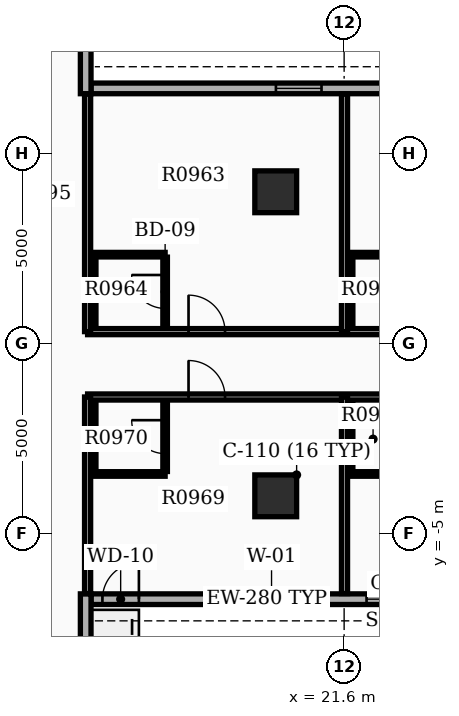
"""IFC4 building model, lengths in metres.
Left out: names, types, materials, properties, quantities, classifications, styles, units other than length and angle.
Written with IfcOpenShell. Run it as: python <this file> out.ifc"""

import sys

from ifc_helpers import new_model, si_unit, direction, frame, frame_2d, origin, origin_2d, place, context, subcontext, project, spatial, rectangle, extrude, element, fill, save


model = new_model("IFC4")
c1 = context("Model", 3, precision=1e-05, world=origin(), true_north=direction((0.0, 1.0)))
c2 = subcontext(c1, "Body", "Model", "MODEL_VIEW")
j1 = project(units=[si_unit("LENGTHUNIT", "METRE"), si_unit("PLANEANGLEUNIT", "RADIAN")], contexts=[c1])
p1 = place(None, origin())
s1 = spatial("IfcSite", under=j1, at=p1, CompositionType="ELEMENT")
p2 = place(p1, origin())
s2 = spatial("IfcBuilding", under=s1, at=p2, CompositionType="ELEMENT")
p3 = place(p2, frame((0.0, 0.0, 63.9)))
s3 = spatial("IfcBuildingStorey", under=s2, at=p3, CompositionType="ELEMENT", Elevation=63.9)
for number, where, z_axis, x_axis in (
    (1, (19.8, -4.0, 0.0), (0.0, 0.0, 1.0), (1.0, 0.0, 0.0)),
    (2, (19.8, 4.0, 0.0), (0.0, 0.0, 1.0), (1.0, 0.0, 0.0)),
):
    element("IfcColumn", number, at=place(p3, frame(where, z_axis=z_axis, x_axis=x_axis)), inside=s3, PredefinedType="COLUMN", context=c2, shape_type="SweptSolid", body=[
        extrude(rectangle(XDim=1.1, YDim=1.1, at=origin_2d()), origin(), (0.0, 0.0, 1.0), 3.9),
    ])
p4 = place(p3, frame((14.94, -6.72, 0.0), z_axis=(0.0, 0.0, 1.0), x_axis=(1.0, 0.0, 0.0)))
e3 = element("IfcWall", 3, at=p4, inside=s3, PredefinedType="STANDARD", context=c2, shape_type="SweptSolid", body=[
    extrude(rectangle(XDim=20.1, YDim=0.28, at=frame_2d((10.05, 0.0))), origin(), (0.0, 0.0, 1.0), 2.91),
])
p5 = place(p4, frame((4.05, 0.0, 0.8)))
e4 = element("IfcOpeningElement", 4, at=p5, cuts=e3, PredefinedType="OPENING", context=c2, shape_type="SweptSolid", body=[
    extrude(rectangle(XDim=1.4, YDim=1.6, at=frame_2d((0.7, 0.8))), frame((0.0, 0.15, 0.0), z_axis=(0.0, -1.0, 0.0), x_axis=(1.0, 0.0, 0.0)), (0.0, 0.0, 1.0), 0.3),
])
p6 = place(p4, frame((7.25, 0.0, 0.8)))
e5 = element("IfcOpeningElement", 5, at=p6, cuts=e3, PredefinedType="OPENING", context=c2, shape_type="SweptSolid", body=[
    extrude(rectangle(XDim=1.4, YDim=1.6, at=frame_2d((0.7, 0.8))), frame((0.0, 0.15, 0.0), z_axis=(0.0, -1.0, 0.0), x_axis=(1.0, 0.0, 0.0)), (0.0, 0.0, 1.0), 0.3),
])
p7 = place(p4, frame((10.45, 0.0, 0.8)))
e6 = element("IfcOpeningElement", 6, at=p7, cuts=e3, PredefinedType="OPENING", context=c2, shape_type="SweptSolid", body=[
    extrude(rectangle(XDim=1.4, YDim=1.6, at=frame_2d((0.7, 0.8))), frame((0.0, 0.15, 0.0), z_axis=(0.0, -1.0, 0.0), x_axis=(1.0, 0.0, 0.0)), (0.0, 0.0, 1.0), 0.3),
])
p8 = place(p4, frame((0.3, 0.0, 0.0)))
e7 = element("IfcOpeningElement", 7, at=p8, cuts=e3, PredefinedType="OPENING", context=c2, shape_type="SweptSolid", body=[
    extrude(rectangle(XDim=0.96, YDim=2.1, at=frame_2d((0.48, 1.05))), frame((0.0, 0.15, 0.0), z_axis=(0.0, -1.0, 0.0), x_axis=(1.0, 0.0, 0.0)), (0.0, 0.0, 1.0), 0.3),
])
p9 = place(p3, frame((35.04, 6.72, 0.0), z_axis=(0.0, 0.0, 1.0), x_axis=(-1.0, 0.0, 0.0)))
e8 = element("IfcWall", 8, at=p9, inside=s3, PredefinedType="STANDARD", context=c2, shape_type="SweptSolid", body=[
    extrude(rectangle(XDim=20.1, YDim=0.28, at=frame_2d((10.05, 0.0))), origin(), (0.0, 0.0, 1.0), 2.91),
])
p10 = place(p9, frame((0.85, 0.0, 0.8)))
e9 = element("IfcOpeningElement", 9, at=p10, cuts=e8, PredefinedType="OPENING", context=c2, shape_type="SweptSolid", body=[
    extrude(rectangle(XDim=1.4, YDim=1.6, at=frame_2d((0.7, 0.8))), frame((0.0, 0.15, 0.0), z_axis=(0.0, -1.0, 0.0), x_axis=(1.0, 0.0, 0.0)), (0.0, 0.0, 1.0), 0.3),
])
p11 = place(p9, frame((4.05, 0.0, 0.8)))
e10 = element("IfcOpeningElement", 10, at=p11, cuts=e8, PredefinedType="OPENING", context=c2, shape_type="SweptSolid", body=[
    extrude(rectangle(XDim=1.4, YDim=1.6, at=frame_2d((0.7, 0.8))), frame((0.0, 0.15, 0.0), z_axis=(0.0, -1.0, 0.0), x_axis=(1.0, 0.0, 0.0)), (0.0, 0.0, 1.0), 0.3),
])
p12 = place(p9, frame((7.25, 0.0, 0.8)))
e11 = element("IfcOpeningElement", 11, at=p12, cuts=e8, PredefinedType="OPENING", context=c2, shape_type="SweptSolid", body=[
    extrude(rectangle(XDim=1.4, YDim=1.6, at=frame_2d((0.7, 0.8))), frame((0.0, 0.15, 0.0), z_axis=(0.0, -1.0, 0.0), x_axis=(1.0, 0.0, 0.0)), (0.0, 0.0, 1.0), 0.3),
])
p13 = place(p9, frame((10.45, 0.0, 0.8)))
e12 = element("IfcOpeningElement", 12, at=p13, cuts=e8, PredefinedType="OPENING", context=c2, shape_type="SweptSolid", body=[
    extrude(rectangle(XDim=1.4, YDim=1.6, at=frame_2d((0.7, 0.8))), frame((0.0, 0.15, 0.0), z_axis=(0.0, -1.0, 0.0), x_axis=(1.0, 0.0, 0.0)), (0.0, 0.0, 1.0), 0.3),
])
p14 = place(p9, frame((14.035, 0.0, 0.85)))
e13 = element("IfcOpeningElement", 13, at=p14, cuts=e8, PredefinedType="OPENING", context=c2, shape_type="SweptSolid", body=[
    extrude(rectangle(XDim=1.2, YDim=1.6, at=frame_2d((0.6, 0.8))), frame((0.0, 0.15, 0.0), z_axis=(0.0, -1.0, 0.0), x_axis=(1.0, 0.0, 0.0)), (0.0, 0.0, 1.0), 0.3),
])
for number, where, z_axis, x_axis in (
    (14, (14.8, 6.58, 0.0), (0.0, 0.0, 1.0), (0.0, 1.0, 0.0)),
    (15, (14.8, -6.58, 0.0), (0.0, 0.0, 1.0), (0.0, -1.0, 0.0)),
):
    element("IfcWall", number, at=place(p3, frame(where, z_axis=z_axis, x_axis=x_axis)), inside=s3, PredefinedType="STANDARD", context=c2, shape_type="SweptSolid", body=[
        extrude(rectangle(XDim=6.86, YDim=0.28, at=frame_2d((3.43, 0.0))), origin(), (0.0, 0.0, 1.0), 2.91),
    ])
p15 = place(p3, frame((14.85, 0.32, 0.0), z_axis=(0.0, 0.0, 1.0), x_axis=(1.0, 0.0, 0.0)))
e16 = element("IfcWall", 16, at=p15, inside=s3, PredefinedType="PARTITIONING", context=c2, shape_type="SweptSolid", body=[
    extrude(rectangle(XDim=20.182, YDim=0.16, at=frame_2d((10.091, 0.0))), origin(), (0.0, 0.0, 1.0), 2.9),
])
p16 = place(p15, frame((2.656, 0.0, 0.0)))
e17 = element("IfcOpeningElement", 17, at=p16, cuts=e16, PredefinedType="OPENING", context=c2, shape_type="SweptSolid", body=[
    extrude(rectangle(XDim=0.96, YDim=2.15, at=frame_2d((0.48, 1.075))), frame((0.0, 0.09, 0.0), z_axis=(0.0, -1.0, 0.0), x_axis=(1.0, 0.0, 0.0)), (0.0, 0.0, 1.0), 0.18),
])
p17 = place(p15, frame((9.442, 0.0, 0.0)))
e18 = element("IfcOpeningElement", 18, at=p17, cuts=e16, PredefinedType="OPENING", context=c2, shape_type="SweptSolid", body=[
    extrude(rectangle(XDim=0.96, YDim=2.15, at=frame_2d((0.48, 1.075))), frame((0.0, 0.09, 0.0), z_axis=(0.0, -1.0, 0.0), x_axis=(1.0, 0.0, 0.0)), (0.0, 0.0, 1.0), 0.18),
])
p18 = place(p15, frame((16.627, 0.0, 0.0)))
e19 = element("IfcOpeningElement", 19, at=p18, cuts=e16, PredefinedType="OPENING", context=c2, shape_type="SweptSolid", body=[
    extrude(rectangle(XDim=0.96, YDim=2.15, at=frame_2d((0.48, 1.075))), frame((0.0, 0.09, 0.0), z_axis=(0.0, -1.0, 0.0), x_axis=(1.0, 0.0, 0.0)), (0.0, 0.0, 1.0), 0.18),
])
for number, where, z_axis, x_axis in (
    (20, (14.85, 0.32, 0.0), (0.0, 0.0, 1.0), (0.0, 1.0, 0.0)),
    (21, (21.61, 0.32, 0.0), (0.0, 0.0, 1.0), (0.0, 1.0, 0.0)),
):
    element("IfcWall", number, at=place(p3, frame(where, z_axis=z_axis, x_axis=x_axis)), inside=s3, PredefinedType="PARTITIONING", context=c2, shape_type="SweptSolid", body=[
        extrude(rectangle(XDim=6.252, YDim=0.16, at=frame_2d((3.126, 0.0))), origin(), (0.0, 0.0, 1.0), 2.9),
    ])
p19 = place(p3, frame((16.89, 0.46, 0.0), z_axis=(0.0, 0.0, 1.0), x_axis=(0.0, 1.0, 0.0)))
e22 = element("IfcWall", 22, at=p19, inside=s3, PredefinedType="PARTITIONING", context=c2, shape_type="SweptSolid", body=[
    extrude(rectangle(XDim=1.82, YDim=0.12, at=frame_2d((0.91, 0.0))), origin(), (0.0, 0.0, 1.0), 2.9),
])
p20 = place(p19, frame((0.47, 0.0, 0.0)))
e23 = element("IfcOpeningElement", 23, at=p20, cuts=e22, PredefinedType="OPENING", context=c2, shape_type="SweptSolid", body=[
    extrude(rectangle(XDim=0.88, YDim=2.1, at=frame_2d((0.44, 1.05))), frame((0.0, 0.07, 0.0), z_axis=(0.0, -1.0, 0.0), x_axis=(1.0, 0.0, 0.0)), (0.0, 0.0, 1.0), 0.14),
])
p21 = place(p3, frame((15.01, 0.46, 0.0), z_axis=(0.0, 0.0, 1.0), x_axis=(0.0, 1.0, 0.0)))
e24 = element("IfcWall", 24, at=p21, inside=s3, PredefinedType="PARTITIONING", context=c2, shape_type="SweptSolid", body=[
    extrude(rectangle(XDim=1.82, YDim=0.12, at=frame_2d((0.91, 0.0))), origin(), (0.0, 0.0, 1.0), 2.9),
])
p22 = place(p3, frame((15.01, 2.345, 0.0), z_axis=(0.0, 0.0, 1.0), x_axis=(1.0, 0.0, 0.0)))
e25 = element("IfcWall", 25, at=p22, inside=s3, PredefinedType="PARTITIONING", context=c2, shape_type="SweptSolid", body=[
    extrude(rectangle(XDim=1.88, YDim=0.12, at=frame_2d((0.94, 0.0))), origin(), (0.0, 0.0, 1.0), 2.9),
])
p23 = place(p3, frame((21.77, 0.46, 0.0), z_axis=(0.0, 0.0, 1.0), x_axis=(0.0, 1.0, 0.0)))
e26 = element("IfcWall", 26, at=p23, inside=s3, PredefinedType="PARTITIONING", context=c2, shape_type="SweptSolid", body=[
    extrude(rectangle(XDim=1.82, YDim=0.12, at=frame_2d((0.91, 0.0))), origin(), (0.0, 0.0, 1.0), 2.9),
])
p24 = place(p3, frame((21.77, 2.345, 0.0), z_axis=(0.0, 0.0, 1.0), x_axis=(1.0, 0.0, 0.0)))
e27 = element("IfcWall", 27, at=p24, inside=s3, PredefinedType="PARTITIONING", context=c2, shape_type="SweptSolid", body=[
    extrude(rectangle(XDim=1.88, YDim=0.12, at=frame_2d((0.94, 0.0))), origin(), (0.0, 0.0, 1.0), 2.9),
])
p25 = place(p3, frame((14.85, -1.4, 0.0), z_axis=(0.0, 0.0, 1.0), x_axis=(1.0, 0.0, 0.0)))
e28 = element("IfcWall", 28, at=p25, inside=s3, PredefinedType="PARTITIONING", context=c2, shape_type="SweptSolid", body=[
    extrude(rectangle(XDim=20.182, YDim=0.16, at=frame_2d((10.091, 0.0))), origin(), (0.0, 0.0, 1.0), 2.9),
])
p26 = place(p25, frame((2.656, 0.0, 0.0)))
e29 = element("IfcOpeningElement", 29, at=p26, cuts=e28, PredefinedType="OPENING", context=c2, shape_type="SweptSolid", body=[
    extrude(rectangle(XDim=0.96, YDim=2.15, at=frame_2d((0.48, 1.075))), frame((0.0, 0.09, 0.0), z_axis=(0.0, -1.0, 0.0), x_axis=(1.0, 0.0, 0.0)), (0.0, 0.0, 1.0), 0.18),
])
p27 = place(p25, frame((9.442, 0.0, 0.0)))
e30 = element("IfcOpeningElement", 30, at=p27, cuts=e28, PredefinedType="OPENING", context=c2, shape_type="SweptSolid", body=[
    extrude(rectangle(XDim=0.96, YDim=2.15, at=frame_2d((0.48, 1.075))), frame((0.0, 0.09, 0.0), z_axis=(0.0, -1.0, 0.0), x_axis=(1.0, 0.0, 0.0)), (0.0, 0.0, 1.0), 0.18),
])
p28 = place(p25, frame((16.627, 0.0, 0.0)))
e31 = element("IfcOpeningElement", 31, at=p28, cuts=e28, PredefinedType="OPENING", context=c2, shape_type="SweptSolid", body=[
    extrude(rectangle(XDim=0.96, YDim=2.15, at=frame_2d((0.48, 1.075))), frame((0.0, 0.09, 0.0), z_axis=(0.0, -1.0, 0.0), x_axis=(1.0, 0.0, 0.0)), (0.0, 0.0, 1.0), 0.18),
])
for number, where, z_axis, x_axis in (
    (32, (14.85, -1.4, 0.0), (0.0, 0.0, 1.0), (0.0, -1.0, 0.0)),
    (33, (21.61, -1.4, 0.0), (0.0, 0.0, 1.0), (0.0, -1.0, 0.0)),
):
    element("IfcWall", number, at=place(p3, frame(where, z_axis=z_axis, x_axis=x_axis)), inside=s3, PredefinedType="PARTITIONING", context=c2, shape_type="SweptSolid", body=[
        extrude(rectangle(XDim=5.172, YDim=0.16, at=frame_2d((2.586, 0.0))), origin(), (0.0, 0.0, 1.0), 2.9),
    ])
p29 = place(p3, frame((16.89, -3.36, 0.0), z_axis=(0.0, 0.0, 1.0), x_axis=(0.0, 1.0, 0.0)))
e34 = element("IfcWall", 34, at=p29, inside=s3, PredefinedType="PARTITIONING", context=c2, shape_type="SweptSolid", body=[
    extrude(rectangle(XDim=1.82, YDim=0.12, at=frame_2d((0.91, 0.0))), origin(), (0.0, 0.0, 1.0), 2.9),
])
p30 = place(p29, frame((0.47, 0.0, 0.0)))
e35 = element("IfcOpeningElement", 35, at=p30, cuts=e34, PredefinedType="OPENING", context=c2, shape_type="SweptSolid", body=[
    extrude(rectangle(XDim=0.88, YDim=2.1, at=frame_2d((0.44, 1.05))), frame((0.0, 0.07, 0.0), z_axis=(0.0, -1.0, 0.0), x_axis=(1.0, 0.0, 0.0)), (0.0, 0.0, 1.0), 0.14),
])
p31 = place(p3, frame((15.01, -3.36, 0.0), z_axis=(0.0, 0.0, 1.0), x_axis=(0.0, 1.0, 0.0)))
e36 = element("IfcWall", 36, at=p31, inside=s3, PredefinedType="PARTITIONING", context=c2, shape_type="SweptSolid", body=[
    extrude(rectangle(XDim=1.82, YDim=0.12, at=frame_2d((0.91, 0.0))), origin(), (0.0, 0.0, 1.0), 2.9),
])
p32 = place(p3, frame((15.01, -3.425, 0.0), z_axis=(0.0, 0.0, 1.0), x_axis=(1.0, 0.0, 0.0)))
e37 = element("IfcWall", 37, at=p32, inside=s3, PredefinedType="PARTITIONING", context=c2, shape_type="SweptSolid", body=[
    extrude(rectangle(XDim=1.88, YDim=0.12, at=frame_2d((0.94, 0.0))), origin(), (0.0, 0.0, 1.0), 2.9),
])
p33 = place(p3, frame((21.77, -3.36, 0.0), z_axis=(0.0, 0.0, 1.0), x_axis=(0.0, 1.0, 0.0)))
e38 = element("IfcWall", 38, at=p33, inside=s3, PredefinedType="PARTITIONING", context=c2, shape_type="SweptSolid", body=[
    extrude(rectangle(XDim=1.82, YDim=0.12, at=frame_2d((0.91, 0.0))), origin(), (0.0, 0.0, 1.0), 2.9),
])
p34 = place(p3, frame((21.77, -3.425, 0.0), z_axis=(0.0, 0.0, 1.0), x_axis=(1.0, 0.0, 0.0)))
e39 = element("IfcWall", 39, at=p34, inside=s3, PredefinedType="PARTITIONING", context=c2, shape_type="SweptSolid", body=[
    extrude(rectangle(XDim=1.88, YDim=0.12, at=frame_2d((0.94, 0.0))), origin(), (0.0, 0.0, 1.0), 2.9),
])
p35 = place(p5, origin())
e40 = element("IfcWindow", 40, at=p35, inside=s3, PartitioningType="SINGLE_PANEL", PredefinedType="WINDOW", context=c2, shape_type="SweptSolid", body=[
    extrude(rectangle(XDim=1.4, YDim=1.6, at=frame_2d((0.7, 0.8))), frame((0.0, 0.03, 0.0), z_axis=(0.0, -1.0, 0.0), x_axis=(1.0, 0.0, 0.0)), (0.0, 0.0, 1.0), 0.06),
])
fill(e4, e40)
p36 = place(p6, origin())
e41 = element("IfcWindow", 41, at=p36, inside=s3, PartitioningType="SINGLE_PANEL", PredefinedType="WINDOW", context=c2, shape_type="SweptSolid", body=[
    extrude(rectangle(XDim=1.4, YDim=1.6, at=frame_2d((0.7, 0.8))), frame((0.0, 0.03, 0.0), z_axis=(0.0, -1.0, 0.0), x_axis=(1.0, 0.0, 0.0)), (0.0, 0.0, 1.0), 0.06),
])
fill(e5, e41)
p37 = place(p8, origin())
e42 = element("IfcDoor", 42, at=p37, inside=s3, OperationType="SINGLE_SWING_RIGHT", PredefinedType="DOOR", context=c2, shape_type="SweptSolid", body=[
    extrude(rectangle(XDim=0.96, YDim=2.1, at=frame_2d((0.48, 1.05))), frame((0.0, 0.025, 0.0), z_axis=(0.0, -1.0, 0.0), x_axis=(1.0, 0.0, 0.0)), (0.0, 0.0, 1.0), 0.05),
])
fill(e7, e42)
p38 = place(p14, origin())
e43 = element("IfcWindow", 43, at=p38, inside=s3, PartitioningType="SINGLE_PANEL", PredefinedType="WINDOW", context=c2, shape_type="SweptSolid", body=[
    extrude(rectangle(XDim=1.2, YDim=1.6, at=frame_2d((0.6, 0.8))), frame((0.0, 0.03, 0.0), z_axis=(0.0, -1.0, 0.0), x_axis=(1.0, 0.0, 0.0)), (0.0, 0.0, 1.0), 0.06),
])
fill(e13, e43)
p39 = place(p16, origin())
e44 = element("IfcDoor", 44, at=p39, inside=s3, OperationType="SINGLE_SWING_LEFT", PredefinedType="DOOR", context=c2, shape_type="SweptSolid", body=[
    extrude(rectangle(XDim=0.96, YDim=2.15, at=frame_2d((0.48, 1.075))), frame((0.0, 0.025, 0.0), z_axis=(0.0, -1.0, 0.0), x_axis=(1.0, 0.0, 0.0)), (0.0, 0.0, 1.0), 0.05),
])
fill(e17, e44)
p40 = place(p20, origin())
e45 = element("IfcDoor", 45, at=p40, inside=s3, OperationType="SINGLE_SWING_RIGHT", PredefinedType="DOOR", context=c2, shape_type="SweptSolid", body=[
    extrude(rectangle(XDim=0.88, YDim=2.1, at=frame_2d((0.44, 1.05))), frame((0.0, 0.025, 0.0), z_axis=(0.0, -1.0, 0.0), x_axis=(1.0, 0.0, 0.0)), (0.0, 0.0, 1.0), 0.05),
])
fill(e23, e45)
p41 = place(p26, origin())
e46 = element("IfcDoor", 46, at=p41, inside=s3, OperationType="SINGLE_SWING_LEFT", PredefinedType="DOOR", context=c2, shape_type="SweptSolid", body=[
    extrude(rectangle(XDim=0.96, YDim=2.15, at=frame_2d((0.48, 1.075))), frame((0.0, 0.025, 0.0), z_axis=(0.0, -1.0, 0.0), x_axis=(1.0, 0.0, 0.0)), (0.0, 0.0, 1.0), 0.05),
])
fill(e29, e46)
p42 = place(p30, origin())
e47 = element("IfcDoor", 47, at=p42, inside=s3, OperationType="SINGLE_SWING_RIGHT", PredefinedType="DOOR", context=c2, shape_type="SweptSolid", body=[
    extrude(rectangle(XDim=0.88, YDim=2.1, at=frame_2d((0.44, 1.05))), frame((0.0, 0.025, 0.0), z_axis=(0.0, -1.0, 0.0), x_axis=(1.0, 0.0, 0.0)), (0.0, 0.0, 1.0), 0.05),
])
fill(e35, e47)
save(model, sys.argv[1])
